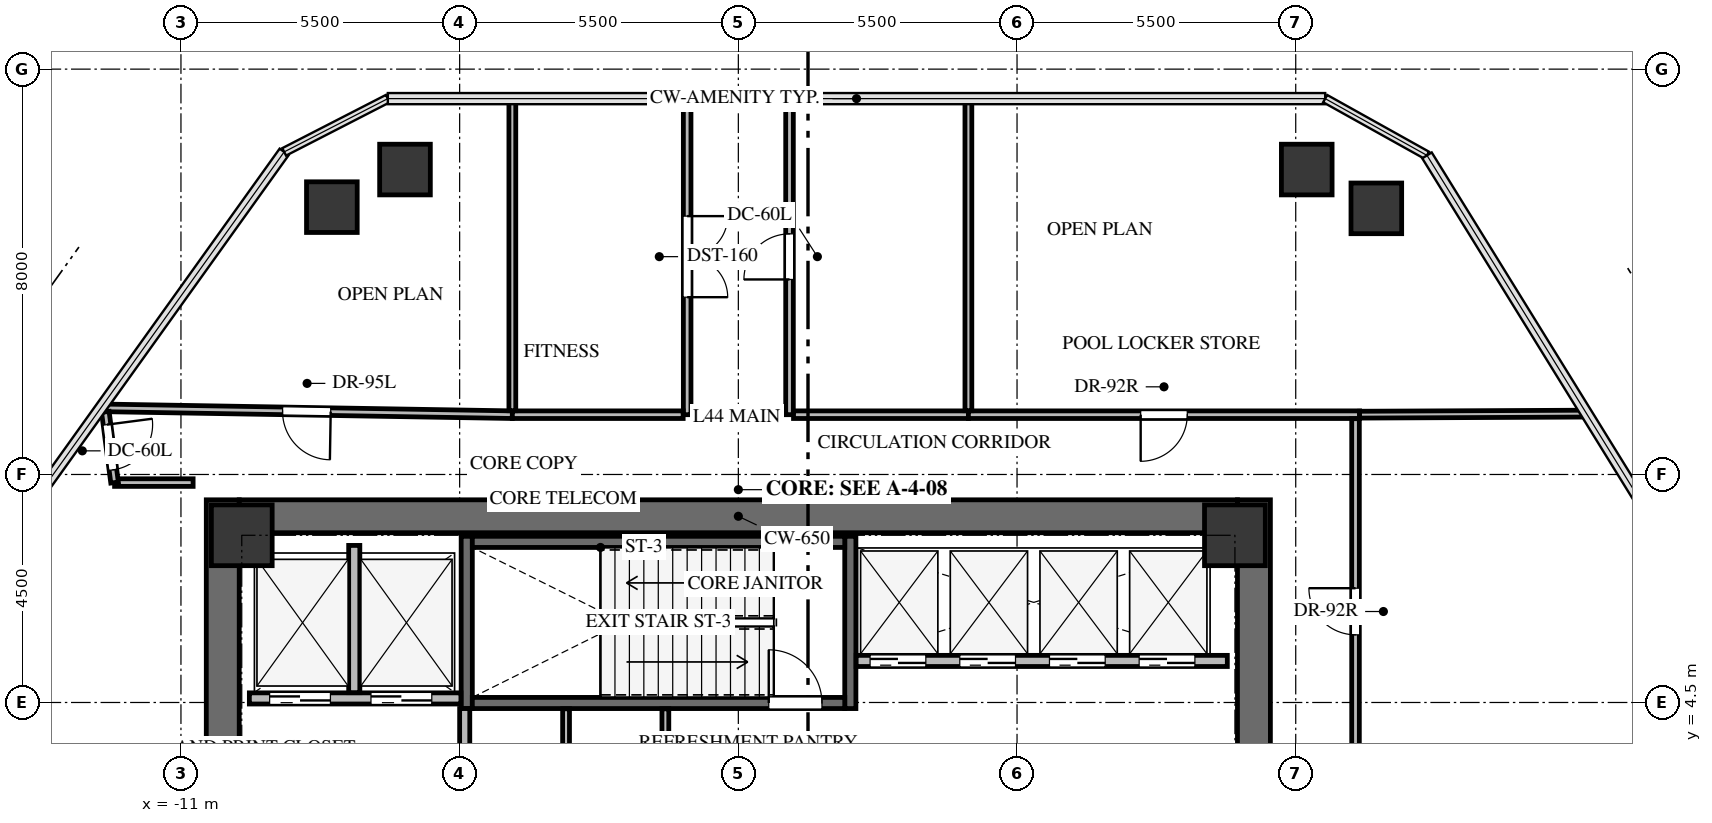
"""IFC4 building model, lengths in metres.
Left out: names, types, materials, properties, quantities, classifications, styles, units other than length and angle.
Written with IfcOpenShell. Run it as: python <this file> out.ifc"""

import sys

from ifc_helpers import new_model, si_unit, direction, frame, frame_2d, origin, origin_2d, place, context, subcontext, project, spatial, rectangle, extrude, source, transform, mapped, element, fill, save


model = new_model("IFC4")
c1 = context("Model", 3, precision=1e-05, world=origin(), true_north=direction((0.0, 1.0)))
c2 = subcontext(c1, "Body", "Model", "MODEL_VIEW")
j1 = project(units=[si_unit("LENGTHUNIT", "METRE"), si_unit("PLANEANGLEUNIT", "RADIAN")], contexts=[c1])
p1 = place(None, origin())
s1 = spatial("IfcSite", under=j1, at=p1, CompositionType="ELEMENT")
p2 = place(p1, origin())
s2 = spatial("IfcBuilding", under=s1, at=p2, CompositionType="ELEMENT")
p3 = place(p2, frame((0.0, 0.0, 162.6)))
s3 = spatial("IfcBuildingStorey", under=s2, at=p3, CompositionType="ELEMENT", Elevation=162.6)
for number, where, z_axis, x_axis in (
    (1, (-10.175, -8.5, 0.0), (0.0, 0.0, 1.0), (0.0, 1.0, 0.0)),
    (2, (10.175, -8.5, 0.0), (0.0, 0.0, 1.0), (0.0, 1.0, 0.0)),
):
    element("IfcWall", number, at=place(p3, frame(where, z_axis=z_axis, x_axis=x_axis)), inside=s3, PredefinedType="SHEAR", context=c2, shape_type="SweptSolid", body=[
        extrude(rectangle(XDim=17.0, YDim=0.65, at=frame_2d((8.5, 0.0))), origin(), (0.0, 0.0, 1.0), 4.6),
    ])
p4 = place(p3, frame((-9.85, 8.175, 0.0), z_axis=(0.0, 0.0, 1.0), x_axis=(1.0, 0.0, 0.0)))
e3 = element("IfcWall", 3, at=p4, inside=s3, PredefinedType="SHEAR", context=c2, shape_type="SweptSolid", body=[
    extrude(rectangle(XDim=19.7, YDim=0.65, at=frame_2d((9.85, 0.0))), origin(), (0.0, 0.0, 1.0), 4.6),
])
for number, where, z_axis, x_axis in (
    (4, (2.21, 4.38, -0.32), (0.0, 0.0, 1.0), (0.0, 1.0, 0.0)),
    (5, (-5.36, 7.78, -0.32), (0.0, 0.0, 1.0), (0.0, -1.0, 0.0)),
):
    element("IfcWall", number, at=place(p3, frame(where, z_axis=z_axis, x_axis=x_axis)), inside=s3, PredefinedType="SHEAR", context=c2, shape_type="SweptSolid", body=[
        extrude(rectangle(XDim=3.4, YDim=0.22, at=frame_2d((1.7, 0.0))), origin(), (0.0, 0.0, 1.0), 4.68),
    ])
p5 = place(p3, frame((-5.25, 4.49, -0.32), z_axis=(0.0, 0.0, 1.0), x_axis=(1.0, 0.0, 0.0)))
e6 = element("IfcWall", 6, at=p5, inside=s3, PredefinedType="SHEAR", context=c2, shape_type="SweptSolid", body=[
    extrude(rectangle(XDim=7.35, YDim=0.22, at=frame_2d((3.675, 0.0))), origin(), (0.0, 0.0, 1.0), 4.68),
])
p6 = place(p5, frame((5.85, 0.0, 0.0)))
e7 = element("IfcOpeningElement", 7, at=p6, cuts=e6, PredefinedType="OPENING", context=c2, shape_type="SweptSolid", body=[
    extrude(rectangle(XDim=1.05, YDim=2.15, at=frame_2d((0.525, 1.075))), frame((0.0, 0.12, 0.0), z_axis=(0.0, -1.0, 0.0), x_axis=(1.0, 0.0, 0.0)), (0.0, 0.0, 1.0), 0.24),
])
p7 = place(p3, frame((2.1, 7.67, -0.32), z_axis=(0.0, 0.0, 1.0), x_axis=(-1.0, 0.0, 0.0)))
e8 = element("IfcWall", 8, at=p7, inside=s3, PredefinedType="SHEAR", context=c2, shape_type="SweptSolid", body=[
    extrude(rectangle(XDim=7.35, YDim=0.22, at=frame_2d((3.675, 0.0))), origin(), (0.0, 0.0, 1.0), 4.68),
])
m1 = source(origin(), c2, "Body", "SweptSolid", [
    extrude(rectangle(XDim=1.2, YDim=1.2, at=origin_2d()), origin(), (0.0, 0.0, 1.0), 4.68),
])
for number, where, z_axis, x_axis in (
    (9, (9.8, 7.8, -0.32), (0.0, 0.0, 1.0), (1.0, 0.0, 0.0)),
    (10, (-9.8, 7.8, -0.32), (0.0, 0.0, 1.0), (1.0, 0.0, 0.0)),
):
    element("IfcColumn", number, at=place(p3, frame(where, z_axis=z_axis, x_axis=x_axis)), inside=s3, PredefinedType="COLUMN", context=c2, shape_type="MappedRepresentation", body=[
        mapped(m1, transform((0.0, 0.0, 0.0), x_axis=(1.0, 0.0, 0.0), y_axis=(0.0, 1.0, 0.0), z_axis=(0.0, 0.0, 1.0), scale=1.0)),
    ])
m2 = source(origin(), c2, "Body", "SweptSolid", [
    extrude(rectangle(XDim=1.0, YDim=1.0, at=origin_2d()), origin(), (0.0, 0.0, 1.0), 4.68),
])
for number, where, z_axis, x_axis in (
    (11, (-8.022, 14.276, -0.32), (0.0, 0.0, 1.0), (1.0, 0.0, 0.0)),
    (12, (-6.579, 15.018, -0.32), (0.0, 0.0, 1.0), (1.0, 0.0, 0.0)),
    (13, (11.218, 15.018, -0.32), (0.0, 0.0, 1.0), (1.0, 0.0, 0.0)),
    (14, (12.591, 14.252, -0.32), (0.0, 0.0, 1.0), (1.0, 0.0, 0.0)),
):
    element("IfcColumn", number, at=place(p3, frame(where, z_axis=z_axis, x_axis=x_axis)), inside=s3, PredefinedType="COLUMN", context=c2, shape_type="MappedRepresentation", body=[
        mapped(m2, transform((0.0, 0.0, 0.0), x_axis=(1.0, 0.0, 0.0), y_axis=(0.0, 1.0, 0.0), z_axis=(0.0, 0.0, 1.0), scale=1.0)),
    ])
p8 = place(p3, frame((-9.65, 4.58, 0.0), z_axis=(0.0, 0.0, 1.0), x_axis=(1.0, 0.0, 0.0)))
e15 = element("IfcWall", 15, at=p8, inside=s3, PredefinedType="SOLIDWALL", context=c2, shape_type="SweptSolid", body=[
    extrude(rectangle(XDim=4.175, YDim=0.22, at=frame_2d((2.087, 0.0))), origin(), (0.0, 0.0, 1.0), 4.345),
])
p9 = place(p8, frame((0.4, 0.0, 0.0)))
e16 = element("IfcOpeningElement", 16, at=p9, cuts=e15, PredefinedType="OPENING", context=c2, shape_type="SweptSolid", body=[
    extrude(rectangle(XDim=1.2, YDim=2.15, at=frame_2d((0.6, 1.075))), frame((0.0, 0.12, 0.0), z_axis=(0.0, -1.0, 0.0), x_axis=(1.0, 0.0, 0.0)), (0.0, 0.0, 1.0), 0.24),
])
p10 = place(p8, frame((2.4, 0.0, 0.0)))
e17 = element("IfcOpeningElement", 17, at=p10, cuts=e15, PredefinedType="OPENING", context=c2, shape_type="SweptSolid", body=[
    extrude(rectangle(XDim=1.2, YDim=2.15, at=frame_2d((0.6, 1.075))), frame((0.0, 0.12, 0.0), z_axis=(0.0, -1.0, 0.0), x_axis=(1.0, 0.0, 0.0)), (0.0, 0.0, 1.0), 0.24),
])
p11 = place(p3, frame((-7.58, 4.694, 0.0), z_axis=(0.0, 0.0, 1.0), x_axis=(0.0, 1.0, 0.0)))
e18 = element("IfcWall", 18, at=p11, inside=s3, PredefinedType="SOLIDWALL", context=c2, shape_type="SweptSolid", body=[
    extrude(rectangle(XDim=2.906, YDim=0.22, at=frame_2d((1.453, 0.0))), origin(), (0.0, 0.0, 1.0), 4.345),
])
p12 = place(p3, frame((-5.4, 0.354, 0.0), z_axis=(0.0, 0.0, 1.0), x_axis=(0.0, 1.0, 0.0)))
e19 = element("IfcWall", 19, at=p12, inside=s3, PredefinedType="SOLIDWALL", context=c2, shape_type="SweptSolid", body=[
    extrude(rectangle(XDim=4.026, YDim=0.2, at=frame_2d((2.013, 0.0))), origin(), (0.0, 0.0, 1.0), 4.345),
])
p13 = place(p12, frame((0.246, 0.0, 0.0)))
e20 = element("IfcOpeningElement", 20, at=p13, cuts=e19, PredefinedType="OPENING", context=c2, shape_type="SweptSolid", body=[
    extrude(rectangle(XDim=1.0, YDim=2.15, at=frame_2d((0.5, 1.075))), frame((0.0, 0.11, 0.0), z_axis=(0.0, -1.0, 0.0), x_axis=(1.0, 0.0, 0.0)), (0.0, 0.0, 1.0), 0.22),
])
p14 = place(p3, frame((2.325, 5.32, 0.0), z_axis=(0.0, 0.0, 1.0), x_axis=(1.0, 0.0, 0.0)))
e21 = element("IfcWall", 21, at=p14, inside=s3, PredefinedType="SOLIDWALL", context=c2, shape_type="SweptSolid", body=[
    extrude(rectangle(XDim=7.325, YDim=0.22, at=frame_2d((3.663, 0.0))), origin(), (0.0, 0.0, 1.0), 4.345),
])
p15 = place(p14, frame((0.275, 0.0, 0.0)))
e22 = element("IfcOpeningElement", 22, at=p15, cuts=e21, PredefinedType="OPENING", context=c2, shape_type="SweptSolid", body=[
    extrude(rectangle(XDim=1.1, YDim=2.15, at=frame_2d((0.55, 1.075))), frame((0.0, 0.12, 0.0), z_axis=(0.0, -1.0, 0.0), x_axis=(1.0, 0.0, 0.0)), (0.0, 0.0, 1.0), 0.24),
])
p16 = place(p14, frame((2.045, 0.0, 0.0)))
e23 = element("IfcOpeningElement", 23, at=p16, cuts=e21, PredefinedType="OPENING", context=c2, shape_type="SweptSolid", body=[
    extrude(rectangle(XDim=1.1, YDim=2.15, at=frame_2d((0.55, 1.075))), frame((0.0, 0.12, 0.0), z_axis=(0.0, -1.0, 0.0), x_axis=(1.0, 0.0, 0.0)), (0.0, 0.0, 1.0), 0.24),
])
p17 = place(p14, frame((3.815, 0.0, 0.0)))
e24 = element("IfcOpeningElement", 24, at=p17, cuts=e21, PredefinedType="OPENING", context=c2, shape_type="SweptSolid", body=[
    extrude(rectangle(XDim=1.1, YDim=2.15, at=frame_2d((0.55, 1.075))), frame((0.0, 0.12, 0.0), z_axis=(0.0, -1.0, 0.0), x_axis=(1.0, 0.0, 0.0)), (0.0, 0.0, 1.0), 0.24),
])
p18 = place(p14, frame((5.585, 0.0, 0.0)))
e25 = element("IfcOpeningElement", 25, at=p18, cuts=e21, PredefinedType="OPENING", context=c2, shape_type="SweptSolid", body=[
    extrude(rectangle(XDim=1.1, YDim=2.15, at=frame_2d((0.55, 1.075))), frame((0.0, 0.12, 0.0), z_axis=(0.0, -1.0, 0.0), x_axis=(1.0, 0.0, 0.0)), (0.0, 0.0, 1.0), 0.24),
])
p19 = place(p3, frame((-4.46, 10.18, 0.0), z_axis=(0.0, 0.0, 1.0), x_axis=(-0.999860278764, 0.016715948973, 0.0)))
e26 = element("IfcWall", 26, at=p19, inside=s3, PredefinedType="PARTITIONING", context=c2, shape_type="SweptSolid", body=[
    extrude(rectangle(XDim=8.121, YDim=0.15, at=frame_2d((4.06, 0.0))), origin(), (0.0, 0.0, 1.0), 3.542),
])
p20 = place(p19, frame((3.585, 0.0, 0.0)))
e27 = element("IfcOpeningElement", 27, at=p20, cuts=e26, PredefinedType="OPENING", context=c2, shape_type="SweptSolid", body=[
    extrude(rectangle(XDim=0.95, YDim=2.1, at=frame_2d((0.475, 1.05))), frame((0.0, 0.085, 0.0), z_axis=(0.0, -1.0, 0.0), x_axis=(1.0, 0.0, 0.0)), (0.0, 0.0, 1.0), 0.17),
])
p21 = place(p3, frame((-1.01, 16.418, 0.0), z_axis=(0.0, 0.0, 1.0), x_axis=(0.0, -1.0, 0.0)))
e28 = element("IfcWall", 28, at=p21, inside=s3, PredefinedType="PARTITIONING", context=c2, shape_type="SweptSolid", body=[
    extrude(rectangle(XDim=6.238, YDim=0.15, at=frame_2d((3.119, 0.0))), origin(), (0.0, 0.0, 1.0), 3.699),
])
p22 = place(p21, frame((2.319, 0.0, 0.0)))
e29 = element("IfcOpeningElement", 29, at=p22, cuts=e28, PredefinedType="OPENING", context=c2, shape_type="SweptSolid", body=[
    extrude(rectangle(XDim=1.6, YDim=2.15, at=frame_2d((0.8, 1.075))), frame((0.0, 0.085, 0.0), z_axis=(0.0, -1.0, 0.0), x_axis=(1.0, 0.0, 0.0)), (0.0, 0.0, 1.0), 0.17),
])
p23 = place(p3, frame((-1.089, 10.18, 0.0), z_axis=(0.0, 0.0, 1.0), x_axis=(-1.0, 0.0, 0.0)))
e30 = element("IfcWall", 30, at=p23, inside=s3, PredefinedType="PARTITIONING", context=c2, shape_type="SweptSolid", body=[
    extrude(rectangle(XDim=3.371, YDim=0.15, at=frame_2d((1.686, 0.0))), origin(), (0.0, 0.0, 1.0), 3.908),
])
p24 = place(p3, frame((1.01, 10.18, 0.0), z_axis=(0.0, 0.0, 1.0), x_axis=(0.0, 1.0, 0.0)))
e31 = element("IfcWall", 31, at=p24, inside=s3, PredefinedType="PARTITIONING", context=c2, shape_type="SweptSolid", body=[
    extrude(rectangle(XDim=6.238, YDim=0.15, at=frame_2d((3.119, 0.0))), origin(), (0.0, 0.0, 1.0), 3.699),
])
p25 = place(p24, frame((2.669, 0.0, 0.0)))
e32 = element("IfcOpeningElement", 32, at=p25, cuts=e31, PredefinedType="OPENING", context=c2, shape_type="SweptSolid", body=[
    extrude(rectangle(XDim=0.9, YDim=2.05, at=frame_2d((0.45, 1.025))), frame((0.0, 0.085, 0.0), z_axis=(0.0, -1.0, 0.0), x_axis=(1.0, 0.0, 0.0)), (0.0, 0.0, 1.0), 0.17),
])
p26 = place(p3, frame((4.54, 10.18, 0.0), z_axis=(0.0, 0.0, 1.0), x_axis=(-1.0, 0.0, 0.0)))
e33 = element("IfcWall", 33, at=p26, inside=s3, PredefinedType="PARTITIONING", context=c2, shape_type="SweptSolid", body=[
    extrude(rectangle(XDim=3.451, YDim=0.15, at=frame_2d((1.726, 0.0))), origin(), (0.0, 0.0, 1.0), 3.908),
])
p27 = place(p3, frame((12.26, 10.18, 0.0), z_axis=(0.0, 0.0, 1.0), x_axis=(-1.0, 0.0, 0.0)))
e34 = element("IfcWall", 34, at=p27, inside=s3, PredefinedType="PARTITIONING", context=c2, shape_type="SweptSolid", body=[
    extrude(rectangle(XDim=7.72, YDim=0.15, at=frame_2d((3.86, 0.0))), origin(), (0.0, 0.0, 1.0), 3.542),
])
p28 = place(p27, frame((3.4, 0.0, 0.0)))
e35 = element("IfcOpeningElement", 35, at=p28, cuts=e34, PredefinedType="OPENING", context=c2, shape_type="SweptSolid", body=[
    extrude(rectangle(XDim=0.92, YDim=2.1, at=frame_2d((0.46, 1.05))), frame((0.0, 0.085, 0.0), z_axis=(0.0, -1.0, 0.0), x_axis=(1.0, 0.0, 0.0)), (0.0, 0.0, 1.0), 0.17),
])
p29 = place(p3, frame((-12.31, 8.84, 0.0), z_axis=(0.0, 0.0, 1.0), x_axis=(1.0, 0.0, 0.0)))
e36 = element("IfcWall", 36, at=p29, inside=s3, PredefinedType="PARTITIONING", context=c2, shape_type="SweptSolid", body=[
    extrude(rectangle(XDim=1.55, YDim=0.15, at=frame_2d((0.775, 0.0))), origin(), (0.0, 0.0, 1.0), 3.699),
])
p30 = place(p3, frame((-12.492, 10.235, 0.0), z_axis=(0.0, 0.0, 1.0), x_axis=(0.129457884372, -0.991584921312, 0.0)))
e37 = element("IfcWall", 37, at=p30, inside=s3, PredefinedType="PARTITIONING", context=c2, shape_type="SweptSolid", body=[
    extrude(rectangle(XDim=1.407, YDim=0.15, at=frame_2d((0.703, 0.0))), origin(), (0.0, 0.0, 1.0), 4.345),
])
p31 = place(p30, frame((0.253, 0.0, 0.0)))
e38 = element("IfcOpeningElement", 38, at=p31, cuts=e37, PredefinedType="OPENING", context=c2, shape_type="SweptSolid", body=[
    extrude(rectangle(XDim=0.9, YDim=2.05, at=frame_2d((0.45, 1.025))), frame((0.0, 0.085, 0.0), z_axis=(0.0, -1.0, 0.0), x_axis=(1.0, 0.0, 0.0)), (0.0, 0.0, 1.0), 0.17),
])
p32 = place(p3, frame((12.18, 2.49, 0.0), z_axis=(0.0, 0.0, 1.0), x_axis=(0.0, 1.0, 0.0)))
e39 = element("IfcWall", 39, at=p32, inside=s3, PredefinedType="PARTITIONING", context=c2, shape_type="SweptSolid", body=[
    extrude(rectangle(XDim=7.611, YDim=0.15, at=frame_2d((3.806, 0.0))), origin(), (0.0, 0.0, 1.0), 4.345),
])
p33 = place(p32, frame((3.345, 0.0, 0.0)))
e40 = element("IfcOpeningElement", 40, at=p33, cuts=e39, PredefinedType="OPENING", context=c2, shape_type="SweptSolid", body=[
    extrude(rectangle(XDim=0.92, YDim=2.1, at=frame_2d((0.46, 1.05))), frame((0.0, 0.085, 0.0), z_axis=(0.0, -1.0, 0.0), x_axis=(1.0, 0.0, 0.0)), (0.0, 0.0, 1.0), 0.17),
])
p34 = place(p3, frame((-3.4, 4.375, 0.0), z_axis=(0.0, 0.0, 1.0), x_axis=(0.0, -1.0, 0.0)))
e41 = element("IfcWall", 41, at=p34, inside=s3, PredefinedType="PARTITIONING", context=c2, shape_type="SweptSolid", body=[
    extrude(rectangle(XDim=2.586, YDim=0.135, at=frame_2d((1.293, 0.0))), origin(), (0.0, 0.0, 1.0), 4.345),
])
p35 = place(p3, frame((-1.44, 4.375, 0.0), z_axis=(0.0, 0.0, 1.0), x_axis=(0.0, -1.0, 0.0)))
e42 = element("IfcWall", 42, at=p35, inside=s3, PredefinedType="PARTITIONING", context=c2, shape_type="SweptSolid", body=[
    extrude(rectangle(XDim=2.561, YDim=0.135, at=frame_2d((1.281, 0.0))), origin(), (0.0, 0.0, 1.0), 4.345),
])
for number, where, z_axis, x_axis in (
    (43, (-4.46, 16.418, 0.0), (0.0, 0.0, 1.0), (0.0, -1.0, 0.0)),
    (44, (4.54, 16.418, 0.0), (0.0, 0.0, 1.0), (0.0, -1.0, 0.0)),
):
    element("IfcWall", number, at=place(p3, frame(where, z_axis=z_axis, x_axis=x_axis)), inside=s3, PredefinedType="PARTITIONING", context=c2, shape_type="SweptSolid", body=[
        extrude(rectangle(XDim=6.159, YDim=0.135, at=frame_2d((3.08, 0.0))), origin(), (0.0, 0.0, 1.0), 3.699),
    ])
p36 = place(p3, frame((16.74, 10.201, 0.0), z_axis=(0.0, 0.0, 1.0), x_axis=(-0.999989522694, -0.004577608714, 0.0)))
e45 = element("IfcWall", 45, at=p36, inside=s3, PredefinedType="PARTITIONING", context=c2, shape_type="SweptSolid", body=[
    extrude(rectangle(XDim=4.48, YDim=0.135, at=frame_2d((2.24, 0.0))), origin(), (0.0, 0.0, 1.0), 3.699),
])
m3 = source(origin(), c2, "Body", "SweptSolid", [
    extrude(rectangle(XDim=1.05, YDim=2.15, at=frame_2d((0.525, 1.075))), frame((0.0, 0.025, 0.0), z_axis=(0.0, -1.0, 0.0), x_axis=(1.0, 0.0, 0.0)), (0.0, 0.0, 1.0), 0.05),
])
p37 = place(p6, origin())
e46 = element("IfcDoor", 46, at=p37, inside=s3, OperationType="SINGLE_SWING_LEFT", PredefinedType="DOOR", context=c2, shape_type="MappedRepresentation", body=[
    mapped(m3, transform((0.0, 0.0, 0.0), x_axis=(1.0, 0.0, 0.0), y_axis=(0.0, 1.0, 0.0), z_axis=(0.0, 0.0, 1.0), scale=1.0)),
])
fill(e7, e46)
m4 = source(origin(), c2, "Body", "SweptSolid", [
    extrude(rectangle(XDim=1.2, YDim=2.15, at=frame_2d((0.6, 1.075))), frame((0.0, 0.025, 0.0), z_axis=(0.0, -1.0, 0.0), x_axis=(1.0, 0.0, 0.0)), (0.0, 0.0, 1.0), 0.05),
])
p38 = place(p9, origin())
e47 = element("IfcDoor", 47, at=p38, inside=s3, OperationType="DOUBLE_DOOR_SLIDING", PredefinedType="DOOR", context=c2, shape_type="MappedRepresentation", body=[
    mapped(m4, transform((0.0, 0.0, 0.0), x_axis=(1.0, 0.0, 0.0), y_axis=(0.0, 1.0, 0.0), z_axis=(0.0, 0.0, 1.0), scale=1.0)),
])
fill(e16, e47)
p39 = place(p10, origin())
e48 = element("IfcDoor", 48, at=p39, inside=s3, OperationType="DOUBLE_DOOR_SLIDING", PredefinedType="DOOR", context=c2, shape_type="MappedRepresentation", body=[
    mapped(m4, transform((0.0, 0.0, 0.0), x_axis=(1.0, 0.0, 0.0), y_axis=(0.0, 1.0, 0.0), z_axis=(0.0, 0.0, 1.0), scale=1.0)),
])
fill(e17, e48)
m5 = source(origin(), c2, "Body", "SweptSolid", [
    extrude(rectangle(XDim=1.1, YDim=2.15, at=frame_2d((0.55, 1.075))), frame((0.0, 0.025, 0.0), z_axis=(0.0, -1.0, 0.0), x_axis=(1.0, 0.0, 0.0)), (0.0, 0.0, 1.0), 0.05),
])
p40 = place(p15, origin())
e49 = element("IfcDoor", 49, at=p40, inside=s3, OperationType="DOUBLE_DOOR_SLIDING", PredefinedType="DOOR", context=c2, shape_type="MappedRepresentation", body=[
    mapped(m5, transform((0.0, 0.0, 0.0), x_axis=(1.0, 0.0, 0.0), y_axis=(0.0, 1.0, 0.0), z_axis=(0.0, 0.0, 1.0), scale=1.0)),
])
fill(e22, e49)
p41 = place(p16, origin())
e50 = element("IfcDoor", 50, at=p41, inside=s3, OperationType="DOUBLE_DOOR_SLIDING", PredefinedType="DOOR", context=c2, shape_type="MappedRepresentation", body=[
    mapped(m5, transform((0.0, 0.0, 0.0), x_axis=(1.0, 0.0, 0.0), y_axis=(0.0, 1.0, 0.0), z_axis=(0.0, 0.0, 1.0), scale=1.0)),
])
fill(e23, e50)
p42 = place(p17, origin())
e51 = element("IfcDoor", 51, at=p42, inside=s3, OperationType="DOUBLE_DOOR_SLIDING", PredefinedType="DOOR", context=c2, shape_type="MappedRepresentation", body=[
    mapped(m5, transform((0.0, 0.0, 0.0), x_axis=(1.0, 0.0, 0.0), y_axis=(0.0, 1.0, 0.0), z_axis=(0.0, 0.0, 1.0), scale=1.0)),
])
fill(e24, e51)
p43 = place(p18, origin())
e52 = element("IfcDoor", 52, at=p43, inside=s3, OperationType="DOUBLE_DOOR_SLIDING", PredefinedType="DOOR", context=c2, shape_type="MappedRepresentation", body=[
    mapped(m5, transform((0.0, 0.0, 0.0), x_axis=(1.0, 0.0, 0.0), y_axis=(0.0, 1.0, 0.0), z_axis=(0.0, 0.0, 1.0), scale=1.0)),
])
fill(e25, e52)
m6 = source(origin(), c2, "Body", "SweptSolid", [
    extrude(rectangle(XDim=0.95, YDim=2.1, at=frame_2d((0.475, 1.05))), frame((0.0, 0.025, 0.0), z_axis=(0.0, -1.0, 0.0), x_axis=(1.0, 0.0, 0.0)), (0.0, 0.0, 1.0), 0.05),
])
p44 = place(p20, origin())
e53 = element("IfcDoor", 53, at=p44, inside=s3, OperationType="SINGLE_SWING_LEFT", PredefinedType="DOOR", context=c2, shape_type="MappedRepresentation", body=[
    mapped(m6, transform((0.0, 0.0, 0.0), x_axis=(1.0, 0.0, 0.0), y_axis=(0.0, 1.0, 0.0), z_axis=(0.0, 0.0, 1.0), scale=1.0)),
])
fill(e27, e53)
m7 = source(origin(), c2, "Body", "SweptSolid", [
    extrude(rectangle(XDim=1.6, YDim=2.15, at=frame_2d((0.8, 1.075))), frame((0.0, 0.025, 0.0), z_axis=(0.0, -1.0, 0.0), x_axis=(1.0, 0.0, 0.0)), (0.0, 0.0, 1.0), 0.05),
])
p45 = place(p22, origin())
e54 = element("IfcDoor", 54, at=p45, inside=s3, OperationType="DOUBLE_DOOR_SINGLE_SWING", PredefinedType="DOOR", context=c2, shape_type="MappedRepresentation", body=[
    mapped(m7, transform((0.0, 0.0, 0.0), x_axis=(1.0, 0.0, 0.0), y_axis=(0.0, 1.0, 0.0), z_axis=(0.0, 0.0, 1.0), scale=1.0)),
])
fill(e29, e54)
m8 = source(origin(), c2, "Body", "SweptSolid", [
    extrude(rectangle(XDim=0.9, YDim=2.05, at=frame_2d((0.45, 1.025))), frame((0.0, 0.025, 0.0), z_axis=(0.0, -1.0, 0.0), x_axis=(1.0, 0.0, 0.0)), (0.0, 0.0, 1.0), 0.05),
])
p46 = place(p25, origin())
e55 = element("IfcDoor", 55, at=p46, inside=s3, OperationType="SINGLE_SWING_LEFT", PredefinedType="DOOR", context=c2, shape_type="MappedRepresentation", body=[
    mapped(m8, transform((0.0, 0.0, 0.0), x_axis=(1.0, 0.0, 0.0), y_axis=(0.0, 1.0, 0.0), z_axis=(0.0, 0.0, 1.0), scale=1.0)),
])
fill(e32, e55)
m9 = source(origin(), c2, "Body", "SweptSolid", [
    extrude(rectangle(XDim=0.92, YDim=2.1, at=frame_2d((0.46, 1.05))), frame((0.0, 0.025, 0.0), z_axis=(0.0, -1.0, 0.0), x_axis=(1.0, 0.0, 0.0)), (0.0, 0.0, 1.0), 0.05),
])
p47 = place(p28, origin())
e56 = element("IfcDoor", 56, at=p47, inside=s3, OperationType="SINGLE_SWING_RIGHT", PredefinedType="DOOR", context=c2, shape_type="MappedRepresentation", body=[
    mapped(m9, transform((0.0, 0.0, 0.0), x_axis=(1.0, 0.0, 0.0), y_axis=(0.0, 1.0, 0.0), z_axis=(0.0, 0.0, 1.0), scale=1.0)),
])
fill(e35, e56)
p48 = place(p31, origin())
e57 = element("IfcDoor", 57, at=p48, inside=s3, OperationType="SINGLE_SWING_LEFT", PredefinedType="DOOR", context=c2, shape_type="MappedRepresentation", body=[
    mapped(m8, transform((0.0, 0.0, 0.0), x_axis=(1.0, 0.0, 0.0), y_axis=(0.0, 1.0, 0.0), z_axis=(0.0, 0.0, 1.0), scale=1.0)),
])
fill(e38, e57)
p49 = place(p33, origin())
e58 = element("IfcDoor", 58, at=p49, inside=s3, OperationType="SINGLE_SWING_RIGHT", PredefinedType="DOOR", context=c2, shape_type="MappedRepresentation", body=[
    mapped(m9, transform((0.0, 0.0, 0.0), x_axis=(1.0, 0.0, 0.0), y_axis=(0.0, 1.0, 0.0), z_axis=(0.0, 0.0, 1.0), scale=1.0)),
])
fill(e40, e58)
save(model, sys.argv[1])
